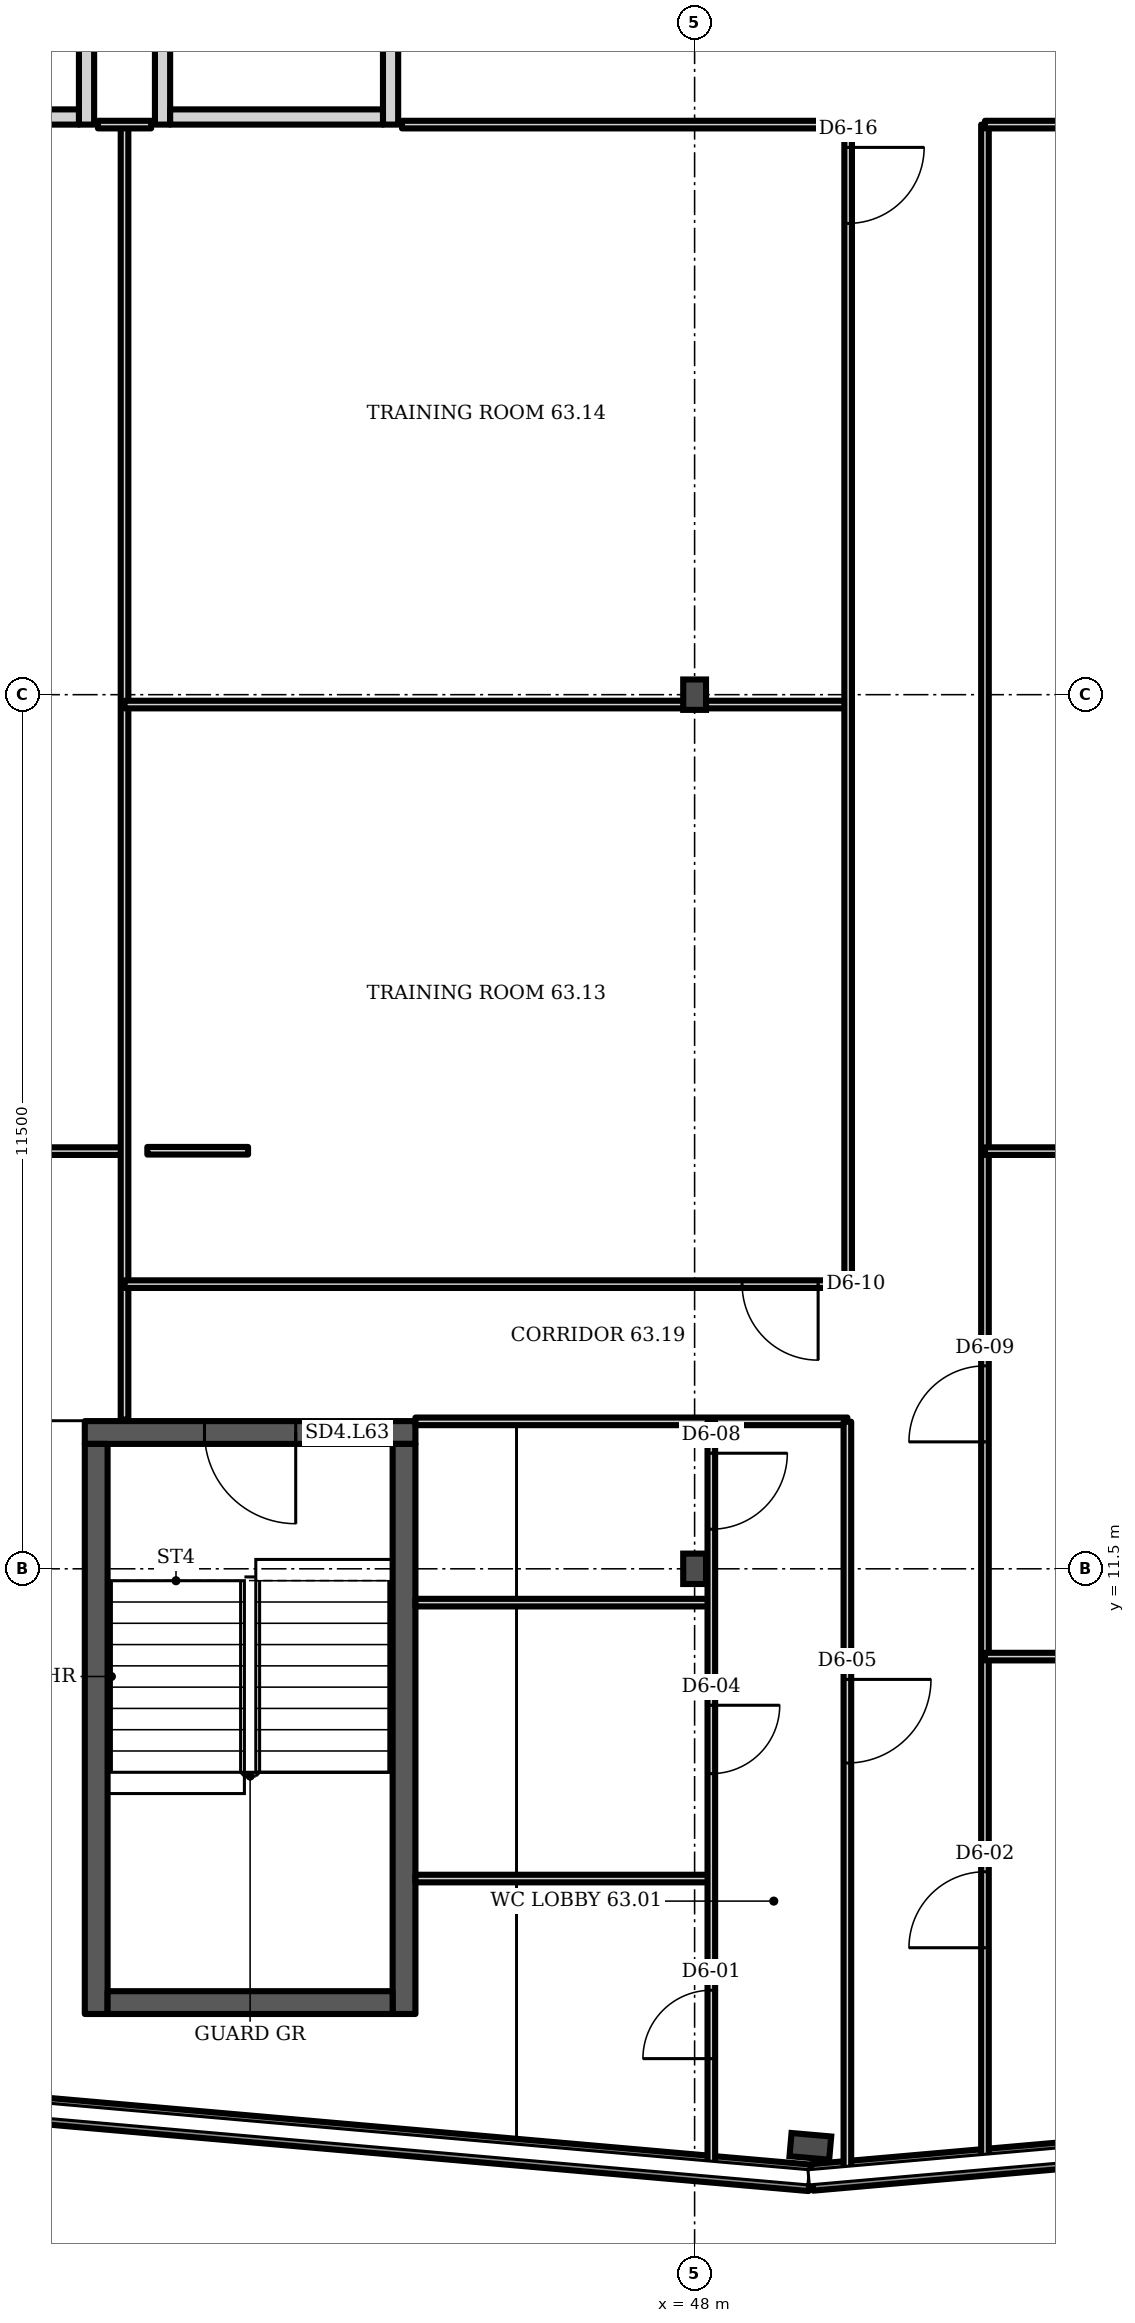
"""IFC4 building model, lengths in metres.
Left out: names, types, materials, properties, quantities, classifications, styles, units other than length and angle.
Written with IfcOpenShell. Run it as: python <this file> out.ifc"""

import sys

from ifc_helpers import new_model, si_unit, direction, frame, frame_2d, origin, origin_2d, place, context, subcontext, project, spatial, rectangle, i_section, extrude, element, fill, save


model = new_model("IFC4")
c1 = context("Model", 3, precision=1e-05, world=origin(), true_north=direction((0.0, 1.0)))
c2 = subcontext(c1, "Body", "Model", "MODEL_VIEW")
j1 = project(units=[si_unit("LENGTHUNIT", "METRE"), si_unit("PLANEANGLEUNIT", "RADIAN")], contexts=[c1])
p1 = place(None, origin())
s1 = spatial("IfcSite", under=j1, at=p1, CompositionType="ELEMENT")
p2 = place(p1, origin())
s2 = spatial("IfcBuilding", under=s1, at=p2, CompositionType="ELEMENT")
p3 = place(p2, frame((0.0, 0.0, 250.3)))
s3 = spatial("IfcBuildingStorey", under=s2, at=p3, CompositionType="ELEMENT", Elevation=250.3)
p4 = place(p3, frame((49.523, 3.902, 0.0), z_axis=(0.0, 0.0, 1.0), x_axis=(-0.087156, -0.996197, 0.0)))
e1 = element("IfcColumn", 1, at=p4, inside=s3, PredefinedType="COLUMN", context=c2, shape_type="SweptSolid", body=[
    extrude(i_section(OverallWidth=0.306, OverallDepth=0.524, WebThickness=0.021, FlangeThickness=0.04, FilletRadius=0.027, at=origin_2d()), origin(), (0.0, 0.0, 1.0), 3.6),
])
for number, where, z_axis, x_axis in (
    (2, (48.0, 11.5, 0.0), (0.0, 0.0, 1.0), (1.0, 0.0, 0.0)),
    (3, (48.0, 23.0, 0.0), (0.0, 0.0, 1.0), (1.0, 0.0, 0.0)),
):
    element("IfcColumn", number, at=place(p3, frame(where, z_axis=z_axis, x_axis=x_axis)), inside=s3, PredefinedType="COLUMN", context=c2, shape_type="SweptSolid", body=[
        extrude(i_section(OverallWidth=0.3, OverallDepth=0.4, WebThickness=0.013, FlangeThickness=0.024, FilletRadius=0.027, at=origin_2d()), origin(), (0.0, 0.0, 1.0), 3.6),
    ])
p5 = place(p3, frame((37.729, 4.519, 0.0), z_axis=(0.0, 0.0, 1.0), x_axis=(0.99619, -0.087167, 0.0)))
e4 = element("IfcWall", 4, at=p5, inside=s3, PredefinedType="SOLIDWALL", context=c2, shape_type="SweptSolid", body=[
    extrude(rectangle(XDim=11.831, YDim=0.35, at=frame_2d((5.915, 0.0))), origin(), (0.0, 0.0, 1.0), 1.0),
])
p6 = place(p3, frame((49.545, 3.493, 0.0), z_axis=(0.0, 0.0, 1.0), x_axis=(0.996196, 0.087138, 0.0)))
e5 = element("IfcWall", 5, at=p6, inside=s3, PredefinedType="SOLIDWALL", context=c2, shape_type="SweptSolid", body=[
    extrude(rectangle(XDim=5.864, YDim=0.35, at=frame_2d((2.932, 0.0))), origin(), (0.0, 0.0, 1.0), 1.0),
])
p7 = place(p3, frame((40.0, 30.5, 0.0), z_axis=(0.0, 0.0, 1.0), x_axis=(0.0, 1.0, 0.0)))
e6 = element("IfcWall", 6, at=p7, inside=s3, PredefinedType="PARTITIONING", context=c2, shape_type="SweptSolid", body=[
    extrude(rectangle(XDim=3.5, YDim=0.2, at=frame_2d((1.75, 0.0))), origin(), (0.0, 0.0, 1.0), 3.2),
])
p8 = place(p3, frame((37.1, 30.6, 0.0), z_axis=(0.0, 0.0, 1.0), x_axis=(1.0, 0.0, 0.0)))
e7 = element("IfcWall", 7, at=p8, inside=s3, PredefinedType="PARTITIONING", context=c2, shape_type="SweptSolid", body=[
    extrude(rectangle(XDim=2.8, YDim=0.2, at=frame_2d((1.4, 0.0))), origin(), (0.0, 0.0, 1.0), 3.2),
])
p9 = place(p3, frame((41.0, 30.5, 0.0), z_axis=(0.0, 0.0, 1.0), x_axis=(0.0, 1.0, 0.0)))
e8 = element("IfcWall", 8, at=p9, inside=s3, PredefinedType="PARTITIONING", context=c2, shape_type="SweptSolid", body=[
    extrude(rectangle(XDim=3.5, YDim=0.2, at=frame_2d((1.75, 0.0))), origin(), (0.0, 0.0, 1.0), 3.2),
])
p10 = place(p3, frame((44.0, 30.5, 0.0), z_axis=(0.0, 0.0, 1.0), x_axis=(0.0, 1.0, 0.0)))
e9 = element("IfcWall", 9, at=p10, inside=s3, PredefinedType="PARTITIONING", context=c2, shape_type="SweptSolid", body=[
    extrude(rectangle(XDim=3.5, YDim=0.2, at=frame_2d((1.75, 0.0))), origin(), (0.0, 0.0, 1.0), 3.2),
])
p11 = place(p10, frame((1.2, 0.0, 0.0)))
e10 = element("IfcOpeningElement", 10, at=p11, cuts=e9, PredefinedType="OPENING", context=c2, shape_type="SweptSolid", body=[
    extrude(rectangle(XDim=1.1, YDim=2.1, at=frame_2d((0.55, 1.05))), frame((0.0, 0.11, 0.0), z_axis=(0.0, -1.0, 0.0), x_axis=(1.0, 0.0, 0.0)), (0.0, 0.0, 1.0), 0.22),
])
p12 = place(p3, frame((41.1, 30.6, 0.0), z_axis=(0.0, 0.0, 1.0), x_axis=(1.0, 0.0, 0.0)))
e11 = element("IfcWall", 11, at=p12, inside=s3, PredefinedType="PARTITIONING", context=c2, shape_type="SweptSolid", body=[
    extrude(rectangle(XDim=2.8, YDim=0.2, at=frame_2d((1.4, 0.0))), origin(), (0.0, 0.0, 1.0), 3.2),
])
p13 = place(p3, frame((39.977, 13.293, 0.0), z_axis=(0.0, 0.0, 1.0), x_axis=(1.0, 0.0, 0.0)))
e12 = element("IfcWall", 12, at=p13, inside=s3, PredefinedType="SHEAR", context=c2, shape_type="SweptSolid", body=[
    extrude(rectangle(XDim=4.35, YDim=0.3, at=frame_2d((2.175, 0.0))), origin(), (0.0, 0.0, 1.0), 3.2),
])
p14 = place(p13, frame((1.575, 0.0, 0.0)))
e13 = element("IfcOpeningElement", 13, at=p14, cuts=e12, PredefinedType="OPENING", context=c2, shape_type="SweptSolid", body=[
    extrude(rectangle(XDim=1.2, YDim=2.1, at=frame_2d((0.6, 1.05))), frame((0.0, 0.16, 0.0), z_axis=(0.0, -1.0, 0.0), x_axis=(1.0, 0.0, 0.0)), (0.0, 0.0, 1.0), 0.32),
])
p15 = place(p3, frame((29.1, 16.995, 0.0), z_axis=(0.0, 0.0, 1.0), x_axis=(1.0, 0.0, 0.0)))
e14 = element("IfcWall", 14, at=p15, inside=s3, PredefinedType="PARTITIONING", context=c2, shape_type="SweptSolid", body=[
    extrude(rectangle(XDim=11.4, YDim=0.1, at=frame_2d((5.7, 0.0))), origin(), (0.0, 0.0, 1.0), 3.2),
])
p16 = place(p3, frame((40.5, 13.463, 0.0), z_axis=(0.0, 0.0, 1.0), x_axis=(0.0, 1.0, 0.0)))
e15 = element("IfcWall", 15, at=p16, inside=s3, PredefinedType="PARTITIONING", context=c2, shape_type="SweptSolid", body=[
    extrude(rectangle(XDim=17.037, YDim=0.1, at=frame_2d((8.519, 0.0))), origin(), (0.0, 0.0, 1.0), 3.2),
])
p17 = place(p3, frame((40.5, 15.245, 0.0), z_axis=(0.0, 0.0, 1.0), x_axis=(1.0, 0.0, 0.0)))
e16 = element("IfcWall", 16, at=p17, inside=s3, PredefinedType="PARTITIONING", context=c2, shape_type="SweptSolid", body=[
    extrude(rectangle(XDim=9.52, YDim=0.1, at=frame_2d((4.76, 0.0))), origin(), (0.0, 0.0, 1.0), 3.2),
])
p18 = place(p17, frame((8.125, 0.0, 0.0)))
e17 = element("IfcOpeningElement", 17, at=p18, cuts=e16, PredefinedType="OPENING", context=c2, shape_type="SweptSolid", body=[
    extrude(rectangle(XDim=1.0, YDim=2.1, at=frame_2d((0.5, 1.05))), frame((0.0, 0.06, 0.0), z_axis=(0.0, -1.0, 0.0), x_axis=(1.0, 0.0, 0.0)), (0.0, 0.0, 1.0), 0.12),
])
p19 = place(p3, frame((40.5, 22.87, 0.0), z_axis=(0.0, 0.0, 1.0), x_axis=(1.0, 0.0, 0.0)))
e18 = element("IfcWall", 18, at=p19, inside=s3, PredefinedType="PARTITIONING", context=c2, shape_type="SweptSolid", body=[
    extrude(rectangle(XDim=9.52, YDim=0.1, at=frame_2d((4.76, 0.0))), origin(), (0.0, 0.0, 1.0), 3.2),
])
p20 = place(p3, frame((40.8, 17.0, 0.0), z_axis=(0.0, 0.0, 1.0), x_axis=(1.0, 0.0, 0.0)))
e19 = element("IfcWall", 19, at=p20, inside=s3, PredefinedType="PARTITIONING", context=c2, shape_type="SweptSolid", body=[
    extrude(rectangle(XDim=1.325, YDim=0.1, at=frame_2d((0.663, 0.0))), origin(), (0.0, 0.0, 1.0), 3.2),
])
for number, where, z_axis, x_axis in (
    (20, (44.327, 7.425, 0.0), (0.0, 0.0, 1.0), (1.0, 0.0, 0.0)),
    (21, (44.327, 11.055, 0.0), (0.0, 0.0, 1.0), (1.0, 0.0, 0.0)),
):
    element("IfcWall", number, at=place(p3, frame(where, z_axis=z_axis, x_axis=x_axis)), inside=s3, PredefinedType="PARTITIONING", context=c2, shape_type="SweptSolid", body=[
        extrude(rectangle(XDim=3.893, YDim=0.1, at=frame_2d((1.946, 0.0))), origin(), (0.0, 0.0, 1.0), 3.2),
    ])
p21 = place(p3, frame((44.327, 13.44, 0.0), z_axis=(0.0, 0.0, 1.0), x_axis=(1.0, 0.0, 0.0)))
e22 = element("IfcWall", 22, at=p21, inside=s3, PredefinedType="PARTITIONING", context=c2, shape_type="SweptSolid", body=[
    extrude(rectangle(XDim=5.683, YDim=0.1, at=frame_2d((2.841, 0.0))), origin(), (0.0, 0.0, 1.0), 3.2),
])
p22 = place(p3, frame((48.22, 3.626, 0.0), z_axis=(0.0, 0.0, 1.0), x_axis=(0.0, 1.0, 0.0)))
e23 = element("IfcWall", 23, at=p22, inside=s3, PredefinedType="PARTITIONING", context=c2, shape_type="SweptSolid", body=[
    extrude(rectangle(XDim=9.809, YDim=0.1, at=frame_2d((4.904, 0.0))), origin(), (0.0, 0.0, 1.0), 2.58),
])
p23 = place(p22, frame((1.43, 0.0, 0.0)))
e24 = element("IfcOpeningElement", 24, at=p23, cuts=e23, PredefinedType="OPENING", context=c2, shape_type="SweptSolid", body=[
    extrude(rectangle(XDim=0.9, YDim=2.1, at=frame_2d((0.45, 1.05))), frame((0.0, 0.06, 0.0), z_axis=(0.0, -1.0, 0.0), x_axis=(1.0, 0.0, 0.0)), (0.0, 0.0, 1.0), 0.12),
])
p24 = place(p22, frame((5.179, 0.0, 0.0)))
e25 = element("IfcOpeningElement", 25, at=p24, cuts=e23, PredefinedType="OPENING", context=c2, shape_type="SweptSolid", body=[
    extrude(rectangle(XDim=0.9, YDim=2.1, at=frame_2d((0.45, 1.05))), frame((0.0, 0.06, 0.0), z_axis=(0.0, -1.0, 0.0), x_axis=(1.0, 0.0, 0.0)), (0.0, 0.0, 1.0), 0.12),
])
p25 = place(p22, frame((8.395, 0.0, 0.0)))
e26 = element("IfcOpeningElement", 26, at=p25, cuts=e23, PredefinedType="OPENING", context=c2, shape_type="SweptSolid", body=[
    extrude(rectangle(XDim=1.0, YDim=2.1, at=frame_2d((0.5, 1.05))), frame((0.0, 0.06, 0.0), z_axis=(0.0, -1.0, 0.0), x_axis=(1.0, 0.0, 0.0)), (0.0, 0.0, 1.0), 0.12),
])
p26 = place(p3, frame((50.01, 3.559, 0.0), z_axis=(0.0, 0.0, 1.0), x_axis=(0.0, 1.0, 0.0)))
e27 = element("IfcWall", 27, at=p26, inside=s3, PredefinedType="PARTITIONING", context=c2, shape_type="SweptSolid", body=[
    extrude(rectangle(XDim=9.876, YDim=0.1, at=frame_2d((4.938, 0.0))), origin(), (0.0, 0.0, 1.0), 2.58),
])
p27 = place(p26, frame((5.386, 0.0, 0.0)))
e28 = element("IfcOpeningElement", 28, at=p27, cuts=e27, PredefinedType="OPENING", context=c2, shape_type="SweptSolid", body=[
    extrude(rectangle(XDim=1.1, YDim=2.1, at=frame_2d((0.55, 1.05))), frame((0.0, 0.06, 0.0), z_axis=(0.0, -1.0, 0.0), x_axis=(1.0, 0.0, 0.0)), (0.0, 0.0, 1.0), 0.12),
])
p28 = place(p3, frame((50.02, 15.245, 0.0), z_axis=(0.0, 0.0, 1.0), x_axis=(0.0, 1.0, 0.0)))
e29 = element("IfcWall", 29, at=p28, inside=s3, PredefinedType="PARTITIONING", context=c2, shape_type="SweptSolid", body=[
    extrude(rectangle(XDim=15.255, YDim=0.1, at=frame_2d((7.627, 0.0))), origin(), (0.0, 0.0, 1.0), 3.2),
])
p29 = place(p28, frame((13.955, 0.0, 0.0)))
e30 = element("IfcOpeningElement", 30, at=p29, cuts=e29, PredefinedType="OPENING", context=c2, shape_type="SweptSolid", body=[
    extrude(rectangle(XDim=1.0, YDim=2.1, at=frame_2d((0.5, 1.05))), frame((0.0, 0.06, 0.0), z_axis=(0.0, -1.0, 0.0), x_axis=(1.0, 0.0, 0.0)), (0.0, 0.0, 1.0), 0.12),
])
p30 = place(p3, frame((51.82, 3.717, 0.0), z_axis=(0.0, 0.0, 1.0), x_axis=(0.0, 1.0, 0.0)))
e31 = element("IfcWall", 31, at=p30, inside=s3, PredefinedType="PARTITIONING", context=c2, shape_type="SweptSolid", body=[
    extrude(rectangle(XDim=26.783, YDim=0.1, at=frame_2d((13.391, 0.0))), origin(), (0.0, 0.0, 1.0), 2.58),
])
p31 = place(p30, frame((2.798, 0.0, 0.0)))
e32 = element("IfcOpeningElement", 32, at=p31, cuts=e31, PredefinedType="OPENING", context=c2, shape_type="SweptSolid", body=[
    extrude(rectangle(XDim=1.0, YDim=2.1, at=frame_2d((0.5, 1.05))), frame((0.0, 0.06, 0.0), z_axis=(0.0, -1.0, 0.0), x_axis=(1.0, 0.0, 0.0)), (0.0, 0.0, 1.0), 0.12),
])
p32 = place(p30, frame((9.453, 0.0, 0.0)))
e33 = element("IfcOpeningElement", 33, at=p32, cuts=e31, PredefinedType="OPENING", context=c2, shape_type="SweptSolid", body=[
    extrude(rectangle(XDim=1.0, YDim=2.1, at=frame_2d((0.5, 1.05))), frame((0.0, 0.06, 0.0), z_axis=(0.0, -1.0, 0.0), x_axis=(1.0, 0.0, 0.0)), (0.0, 0.0, 1.0), 0.12),
])
p33 = place(p3, frame((51.82, 10.345, 0.0), z_axis=(0.0, 0.0, 1.0), x_axis=(1.0, 0.0, 0.0)))
e34 = element("IfcWall", 34, at=p33, inside=s3, PredefinedType="PARTITIONING", context=c2, shape_type="SweptSolid", body=[
    extrude(rectangle(XDim=6.305, YDim=0.1, at=frame_2d((3.152, 0.0))), origin(), (0.0, 0.0, 1.0), 3.2),
])
p34 = place(p3, frame((51.82, 16.995, 0.0), z_axis=(0.0, 0.0, 1.0), x_axis=(1.0, 0.0, 0.0)))
e35 = element("IfcWall", 35, at=p34, inside=s3, PredefinedType="PARTITIONING", context=c2, shape_type="SweptSolid", body=[
    extrude(rectangle(XDim=13.1, YDim=0.1, at=frame_2d((6.55, 0.0))), origin(), (0.0, 0.0, 1.0), 3.2),
])
p35 = place(p3, frame((51.82, 30.5, 0.0), z_axis=(0.0, 0.0, 1.0), x_axis=(1.0, 0.0, 0.0)))
e36 = element("IfcWall", 36, at=p35, inside=s3, PredefinedType="PARTITIONING", context=c2, shape_type="SweptSolid", body=[
    extrude(rectangle(XDim=6.18, YDim=0.1, at=frame_2d((3.09, 0.0))), origin(), (0.0, 0.0, 1.0), 3.2),
])
p36 = place(p3, frame((40.15, 30.5, 0.0), z_axis=(0.0, 0.0, 1.0), x_axis=(1.0, 0.0, 0.0)))
e37 = element("IfcWall", 37, at=p36, inside=s3, PredefinedType="PARTITIONING", context=c2, shape_type="SweptSolid", body=[
    extrude(rectangle(XDim=0.7, YDim=0.1, at=frame_2d((0.35, 0.0))), origin(), (0.0, 0.0, 1.0), 3.2),
])
p37 = place(p3, frame((44.15, 30.5, 0.0), z_axis=(0.0, 0.0, 1.0), x_axis=(1.0, 0.0, 0.0)))
e38 = element("IfcWall", 38, at=p37, inside=s3, PredefinedType="PARTITIONING", context=c2, shape_type="SweptSolid", body=[
    extrude(rectangle(XDim=5.87, YDim=0.1, at=frame_2d((2.935, 0.0))), origin(), (0.0, 0.0, 1.0), 3.2),
])
for number, where, z_axis, x_axis in (
    (39, (40.127, 5.643, 0.0), (0.0, 0.0, 1.0), (0.0, 1.0, 0.0)),
    (40, (44.177, 5.643, 0.0), (0.0, 0.0, 1.0), (0.0, 1.0, 0.0)),
):
    element("IfcWall", number, at=place(p3, frame(where, z_axis=z_axis, x_axis=x_axis)), inside=s3, PredefinedType="SHEAR", context=c2, shape_type="SweptSolid", body=[
        extrude(rectangle(XDim=7.5, YDim=0.3, at=frame_2d((3.75, 0.0))), origin(), (0.0, 0.0, 1.0), 3.2),
    ])
p38 = place(p3, frame((40.277, 5.793, 0.0), z_axis=(0.0, 0.0, 1.0), x_axis=(1.0, 0.0, 0.0)))
e41 = element("IfcWall", 41, at=p38, inside=s3, PredefinedType="SHEAR", context=c2, shape_type="SweptSolid", body=[
    extrude(rectangle(XDim=3.75, YDim=0.3, at=frame_2d((1.875, 0.0))), origin(), (0.0, 0.0, 1.0), 3.2),
])
p39 = place(p14, origin())
e42 = element("IfcDoor", 42, at=p39, inside=s3, OperationType="SINGLE_SWING_RIGHT", PredefinedType="DOOR", context=c2, shape_type="SweptSolid", body=[
    extrude(rectangle(XDim=1.2, YDim=2.1, at=frame_2d((0.6, 1.05))), frame((0.0, 0.025, 0.0), z_axis=(0.0, -1.0, 0.0), x_axis=(1.0, 0.0, 0.0)), (0.0, 0.0, 1.0), 0.05),
])
fill(e13, e42)
p40 = place(p23, origin())
e43 = element("IfcDoor", 43, at=p40, inside=s3, OperationType="SINGLE_SWING_LEFT", PredefinedType="DOOR", context=c2, shape_type="SweptSolid", body=[
    extrude(rectangle(XDim=0.9, YDim=2.1, at=frame_2d((0.45, 1.05))), frame((0.0, 0.025, 0.0), z_axis=(0.0, -1.0, 0.0), x_axis=(1.0, 0.0, 0.0)), (0.0, 0.0, 1.0), 0.05),
])
fill(e24, e43)
p41 = place(p31, origin())
e44 = element("IfcDoor", 44, at=p41, inside=s3, OperationType="SINGLE_SWING_LEFT", PredefinedType="DOOR", context=c2, shape_type="SweptSolid", body=[
    extrude(rectangle(XDim=1.0, YDim=2.1, at=frame_2d((0.5, 1.05))), frame((0.0, 0.025, 0.0), z_axis=(0.0, -1.0, 0.0), x_axis=(1.0, 0.0, 0.0)), (0.0, 0.0, 1.0), 0.05),
])
fill(e32, e44)
p42 = place(p24, origin())
e45 = element("IfcDoor", 45, at=p42, inside=s3, OperationType="SINGLE_SWING_RIGHT", PredefinedType="DOOR", context=c2, shape_type="SweptSolid", body=[
    extrude(rectangle(XDim=0.9, YDim=2.1, at=frame_2d((0.45, 1.05))), frame((0.0, 0.025, 0.0), z_axis=(0.0, -1.0, 0.0), x_axis=(1.0, 0.0, 0.0)), (0.0, 0.0, 1.0), 0.05),
])
fill(e25, e45)
p43 = place(p27, origin())
e46 = element("IfcDoor", 46, at=p43, inside=s3, OperationType="SINGLE_SWING_RIGHT", PredefinedType="DOOR", context=c2, shape_type="SweptSolid", body=[
    extrude(rectangle(XDim=1.1, YDim=2.1, at=frame_2d((0.55, 1.05))), frame((0.0, 0.025, 0.0), z_axis=(0.0, -1.0, 0.0), x_axis=(1.0, 0.0, 0.0)), (0.0, 0.0, 1.0), 0.05),
])
fill(e28, e46)
p44 = place(p25, origin())
e47 = element("IfcDoor", 47, at=p44, inside=s3, OperationType="SINGLE_SWING_RIGHT", PredefinedType="DOOR", context=c2, shape_type="SweptSolid", body=[
    extrude(rectangle(XDim=1.0, YDim=2.1, at=frame_2d((0.5, 1.05))), frame((0.0, 0.025, 0.0), z_axis=(0.0, -1.0, 0.0), x_axis=(1.0, 0.0, 0.0)), (0.0, 0.0, 1.0), 0.05),
])
fill(e26, e47)
p45 = place(p32, origin())
e48 = element("IfcDoor", 48, at=p45, inside=s3, OperationType="SINGLE_SWING_LEFT", PredefinedType="DOOR", context=c2, shape_type="SweptSolid", body=[
    extrude(rectangle(XDim=1.0, YDim=2.1, at=frame_2d((0.5, 1.05))), frame((0.0, 0.025, 0.0), z_axis=(0.0, -1.0, 0.0), x_axis=(1.0, 0.0, 0.0)), (0.0, 0.0, 1.0), 0.05),
])
fill(e33, e48)
p46 = place(p18, origin())
e49 = element("IfcDoor", 49, at=p46, inside=s3, OperationType="SINGLE_SWING_RIGHT", PredefinedType="DOOR", context=c2, shape_type="SweptSolid", body=[
    extrude(rectangle(XDim=1.0, YDim=2.1, at=frame_2d((0.5, 1.05))), frame((0.0, 0.025, 0.0), z_axis=(0.0, -1.0, 0.0), x_axis=(1.0, 0.0, 0.0)), (0.0, 0.0, 1.0), 0.05),
])
fill(e17, e49)
p47 = place(p29, origin())
e50 = element("IfcDoor", 50, at=p47, inside=s3, OperationType="SINGLE_SWING_RIGHT", PredefinedType="DOOR", context=c2, shape_type="SweptSolid", body=[
    extrude(rectangle(XDim=1.0, YDim=2.1, at=frame_2d((0.5, 1.05))), frame((0.0, 0.025, 0.0), z_axis=(0.0, -1.0, 0.0), x_axis=(1.0, 0.0, 0.0)), (0.0, 0.0, 1.0), 0.05),
])
fill(e30, e50)
save(model, sys.argv[1])
